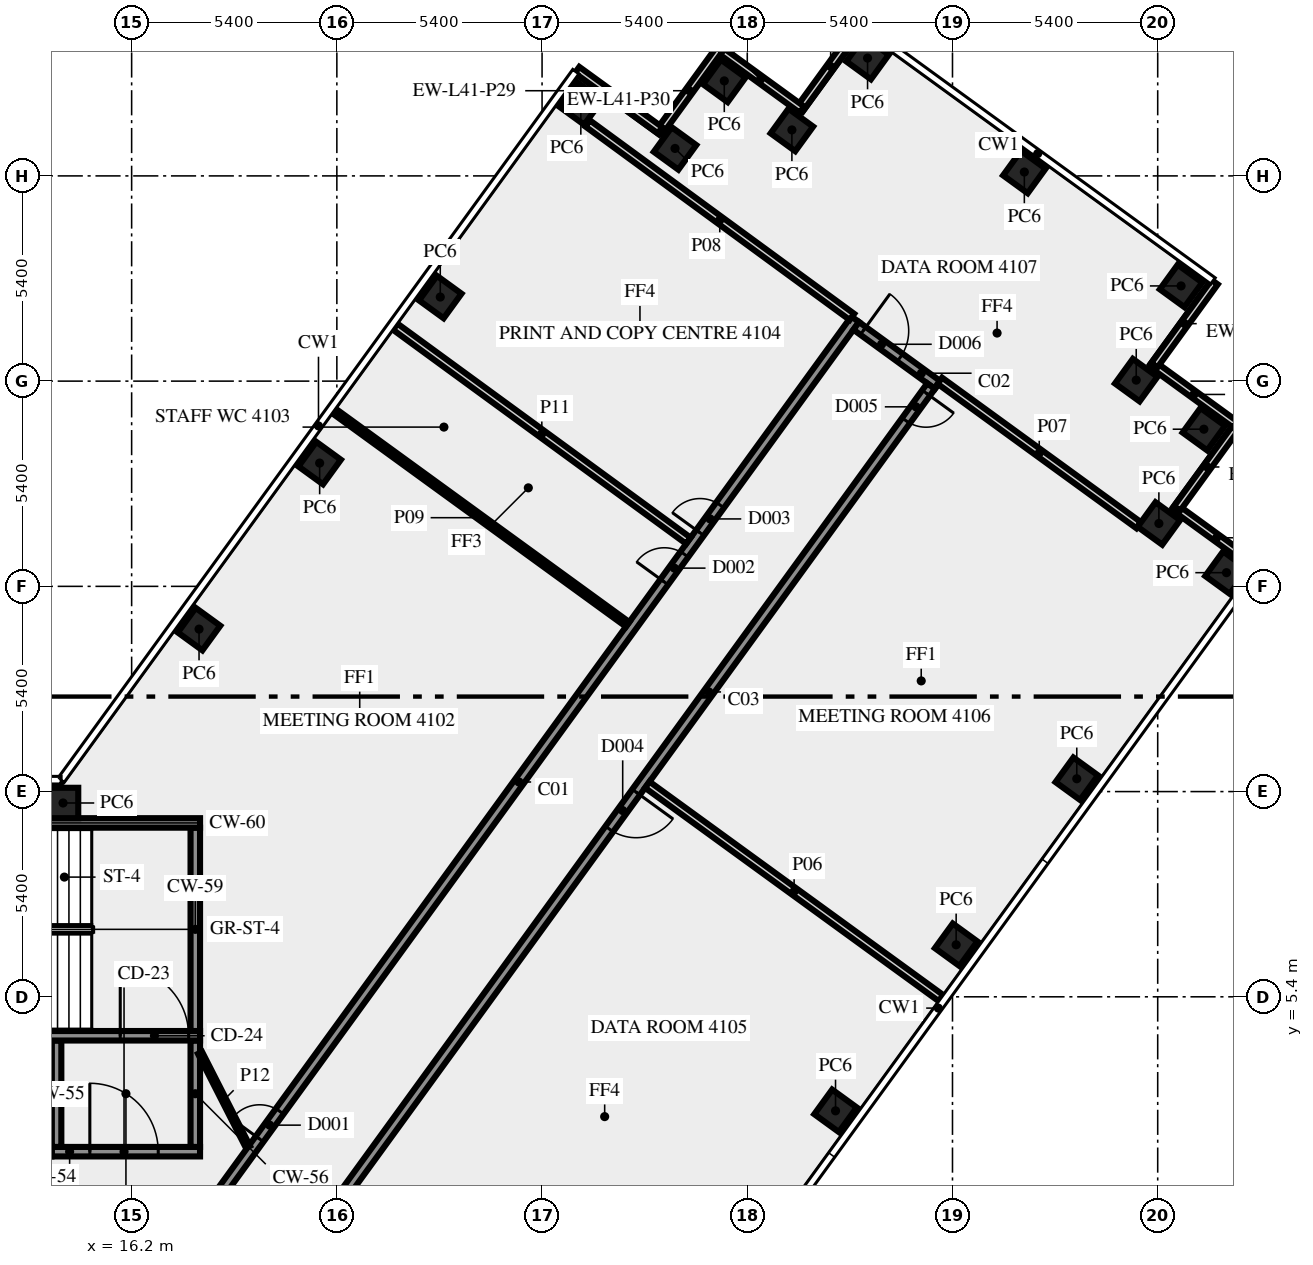
"""IFC4 building model, lengths in metres.
Left out: names, types, materials, properties, quantities, classifications, styles, units other than length and angle.
Written with IfcOpenShell. Run it as: python <this file> out.ifc"""

import sys

from ifc_helpers import new_model, si_unit, direction, frame, frame_2d, origin, origin_2d, place, context, subcontext, project, spatial, rectangle, extrude, element, fill, save


model = new_model("IFC4")
c1 = context("Model", 3, precision=1e-05, world=origin(), true_north=direction((0.0, 1.0)))
c2 = subcontext(c1, "Body", "Model", "MODEL_VIEW")
j1 = project(units=[si_unit("LENGTHUNIT", "METRE"), si_unit("PLANEANGLEUNIT", "RADIAN")], contexts=[c1])
p1 = place(None, origin())
s1 = spatial("IfcSite", under=j1, at=p1, CompositionType="ELEMENT")
p2 = place(p1, origin())
s2 = spatial("IfcBuilding", under=s1, at=p2, CompositionType="ELEMENT")
p3 = place(p2, frame((0.0, 0.0, 176.0)))
s3 = spatial("IfcBuildingStorey", under=s2, at=p3, CompositionType="ELEMENT", Elevation=176.0)
for number, where, z_axis, x_axis in (
    (1, (34.722, 2.4, 0.0), (0.0, 0.0, 1.0), (0.588, 0.809, 0.0)),
    (2, (37.896, 6.769, 0.0), (0.0, 0.0, 1.0), (0.588, 0.809, 0.0)),
    (3, (41.07, 11.137, 0.0), (0.0, 0.0, 1.0), (0.588, 0.809, 0.0)),
    (4, (45.01, 16.56, 0.0), (0.0, 0.0, 1.0), (0.588, 0.809, 0.0)),
    (5, (43.231, 17.854, 0.0), (0.0, 0.0, 1.0), (0.588, 0.809, 0.0)),
    (6, (44.415, 20.335, 0.0), (0.0, 0.0, 1.0), (0.588, 0.809, 0.0)),
    (7, (42.635, 21.626, 0.0), (0.0, 0.0, 1.0), (-0.809, 0.588, 0.0)),
    (8, (43.815, 24.105, 0.0), (0.0, 0.0, 1.0), (-0.809, 0.588, 0.0)),
    (9, (39.691, 27.102, 0.0), (0.0, 0.0, 1.0), (-0.809, 0.588, 0.0)),
    (10, (35.565, 30.1, 0.0), (0.0, 0.0, 1.0), (-0.588, -0.809, 0.0)),
    (11, (33.574, 28.209, 0.0), (0.0, 0.0, 1.0), (-0.809, 0.588, 0.0)),
    (12, (31.795, 29.5, 0.0), (0.0, 0.0, 1.0), (-0.588, -0.809, 0.0)),
    (13, (30.499, 27.723, 0.0), (0.0, 0.0, 1.0), (-0.809, 0.588, 0.0)),
    (14, (28.02, 28.905, 0.0), (0.0, 0.0, 1.0), (-0.809, 0.588, 0.0)),
    (15, (24.321, 23.812, 0.0), (0.0, 0.0, 1.0), (-0.588, -0.809, 0.0)),
    (16, (21.147, 19.444, 0.0), (0.0, 0.0, 1.0), (-0.588, -0.809, 0.0)),
    (17, (17.974, 15.075, 0.0), (0.0, 0.0, 1.0), (-0.588, -0.809, 0.0)),
    (18, (14.395, 10.5, 0.0), (0.0, 0.0, 1.0), (-1.0, 0.0, 0.0)),
):
    element("IfcColumn", number, at=place(p3, frame(where, z_axis=z_axis, x_axis=x_axis)), inside=s3, PredefinedType="COLUMN", context=c2, shape_type="SweptSolid", body=[
        extrude(rectangle(XDim=0.8, YDim=0.8, at=origin_2d()), origin(), (0.0, 0.0, 1.0), 3.65),
    ])
for number, where, z_axis, x_axis in (
    (19, (45.842, 16.685, 0.0), (0.0, 0.0, 1.0), (-0.809, 0.588, 0.0)),
    (20, (43.709, 18.249, 0.0), (0.0, 0.0, 1.0), (0.588, 0.809, 0.0)),
    (21, (45.245, 20.456, 0.0), (0.0, 0.0, 1.0), (-0.809, 0.588, 0.0)),
    (22, (43.113, 22.02, 0.0), (0.0, 0.0, 1.0), (0.588, 0.809, 0.0)),
    (23, (35.388, 30.97, 0.0), (0.0, 0.0, 1.0), (-0.588, -0.809, 0.0)),
    (24, (33.838, 28.744, 0.0), (0.0, 0.0, 1.0), (-0.809, 0.588, 0.0)),
    (25, (31.67, 30.333, 0.0), (0.0, 0.0, 1.0), (-0.588, -0.809, 0.0)),
    (26, (30.106, 28.2, 0.0), (0.0, 0.0, 1.0), (-0.809, 0.588, 0.0)),
):
    element("IfcWall", number, at=place(p3, frame(where, z_axis=z_axis, x_axis=x_axis)), inside=s3, PredefinedType="SOLIDWALL", context=c2, shape_type="SweptSolid", body=[
        extrude(rectangle(XDim=2.7, YDim=0.2, at=frame_2d((1.35, 0.0))), origin(), (0.0, 0.0, 1.0), 3.65),
    ])
p4 = place(p3, frame((14.1, 1.325, 0.0), z_axis=(0.0, 0.0, 1.0), x_axis=(1.0, 0.0, 0.0)))
e27 = element("IfcWall", 27, at=p4, inside=s3, PredefinedType="SHEAR", context=c2, shape_type="SweptSolid", body=[
    extrude(rectangle(XDim=3.9, YDim=0.25, at=frame_2d((1.95, 0.0))), origin(), (0.0, 0.0, 1.0), 3.65),
])
p5 = place(p4, frame((1.0, 0.0, 0.0)))
e28 = element("IfcOpeningElement", 28, at=p5, cuts=e27, PredefinedType="OPENING", context=c2, shape_type="SweptSolid", body=[
    extrude(rectangle(XDim=1.8, YDim=2.1, at=frame_2d((0.9, 1.05))), frame((0.0, 0.135, 0.0), z_axis=(0.0, -1.0, 0.0), x_axis=(1.0, 0.0, 0.0)), (0.0, 0.0, 1.0), 0.27),
])
for number, where, z_axis, x_axis in (
    (29, (14.225, 1.45, 0.0), (0.0, 0.0, 1.0), (0.0, 1.0, 0.0)),
    (30, (17.875, 1.45, 0.0), (0.0, 0.0, 1.0), (0.0, 1.0, 0.0)),
):
    element("IfcWall", number, at=place(p3, frame(where, z_axis=z_axis, x_axis=x_axis)), inside=s3, PredefinedType="SHEAR", context=c2, shape_type="SweptSolid", body=[
        extrude(rectangle(XDim=2.8, YDim=0.25, at=frame_2d((1.4, 0.0))), origin(), (0.0, 0.0, 1.0), 3.65),
    ])
p6 = place(p3, frame((7.5, 4.375, 0.0), z_axis=(0.0, 0.0, 1.0), x_axis=(1.0, 0.0, 0.0)))
e31 = element("IfcWall", 31, at=p6, inside=s3, PredefinedType="SHEAR", context=c2, shape_type="SweptSolid", body=[
    extrude(rectangle(XDim=10.5, YDim=0.25, at=frame_2d((5.25, 0.0))), origin(), (0.0, 0.0, 1.0), 3.65),
])
p7 = place(p6, frame((8.4, 0.0, 0.0)))
e32 = element("IfcOpeningElement", 32, at=p7, cuts=e31, PredefinedType="OPENING", context=c2, shape_type="SweptSolid", body=[
    extrude(rectangle(XDim=1.8, YDim=2.1, at=frame_2d((0.9, 1.05))), frame((0.0, 0.135, 0.0), z_axis=(0.0, -1.0, 0.0), x_axis=(1.0, 0.0, 0.0)), (0.0, 0.0, 1.0), 0.27),
])
p8 = place(p3, frame((17.875, 4.5, 0.0), z_axis=(0.0, 0.0, 1.0), x_axis=(0.0, 1.0, 0.0)))
e33 = element("IfcWall", 33, at=p8, inside=s3, PredefinedType="SHEAR", context=c2, shape_type="SweptSolid", body=[
    extrude(rectangle(XDim=5.35, YDim=0.25, at=frame_2d((2.675, 0.0))), origin(), (0.0, 0.0, 1.0), 3.65),
])
p9 = place(p3, frame((7.5, 9.975, 0.0), z_axis=(0.0, 0.0, 1.0), x_axis=(1.0, 0.0, 0.0)))
e34 = element("IfcWall", 34, at=p9, inside=s3, PredefinedType="SHEAR", context=c2, shape_type="SweptSolid", body=[
    extrude(rectangle(XDim=10.5, YDim=0.25, at=frame_2d((5.25, 0.0))), origin(), (0.0, 0.0, 1.0), 3.65),
])
p10 = place(p9, frame((2.0, 0.0, 1.0)))
e35 = element("IfcOpeningElement", 35, at=p10, cuts=e34, PredefinedType="OPENING", context=c2, shape_type="SweptSolid", body=[
    extrude(rectangle(XDim=1.2, YDim=1.2, at=frame_2d((0.6, 0.6))), frame((0.0, 0.135, 0.0), z_axis=(0.0, -1.0, 0.0), x_axis=(1.0, 0.0, 0.0)), (0.0, 0.0, 1.0), 0.27),
])
p11 = place(p3, frame((17.545, -1.125, 0.0), z_axis=(0.0, 0.0, 1.0), x_axis=(0.587786330937, 0.809016210693, 0.0)))
e36 = element("IfcWall", 36, at=p11, inside=s3, PredefinedType="SOLIDWALL", context=c2, shape_type="SweptSolid", body=[
    extrude(rectangle(XDim=30.103, YDim=0.25, at=frame_2d((15.052, 0.0))), origin(), (0.0, 0.0, 1.0), 3.65),
])
p12 = place(p11, frame((3.441, 0.0, 0.0)))
e37 = element("IfcOpeningElement", 37, at=p12, cuts=e36, PredefinedType="OPENING", context=c2, shape_type="SweptSolid", body=[
    extrude(rectangle(XDim=0.9, YDim=2.1, at=frame_2d((0.45, 1.05))), frame((0.0, 0.135, 0.0), z_axis=(0.0, -1.0, 0.0), x_axis=(1.0, 0.0, 0.0)), (0.0, 0.0, 1.0), 0.27),
])
p13 = place(p11, frame((23.158, 0.0, 0.0)))
e38 = element("IfcOpeningElement", 38, at=p13, cuts=e36, PredefinedType="OPENING", context=c2, shape_type="SweptSolid", body=[
    extrude(rectangle(XDim=0.9, YDim=2.1, at=frame_2d((0.45, 1.05))), frame((0.0, 0.135, 0.0), z_axis=(0.0, -1.0, 0.0), x_axis=(1.0, 0.0, 0.0)), (0.0, 0.0, 1.0), 0.27),
])
p14 = place(p11, frame((21.558, 0.0, 0.0)))
e39 = element("IfcOpeningElement", 39, at=p14, cuts=e36, PredefinedType="OPENING", context=c2, shape_type="SweptSolid", body=[
    extrude(rectangle(XDim=0.9, YDim=2.1, at=frame_2d((0.45, 1.05))), frame((0.0, 0.135, 0.0), z_axis=(0.0, -1.0, 0.0), x_axis=(1.0, 0.0, 0.0)), (0.0, 0.0, 1.0), 0.27),
])
p15 = place(p3, frame((35.267, 23.054, 0.0), z_axis=(0.0, 0.0, 1.0), x_axis=(0.809038743598, -0.587755315891, 0.0)))
e40 = element("IfcWall", 40, at=p15, inside=s3, PredefinedType="SOLIDWALL", context=c2, shape_type="SweptSolid", body=[
    extrude(rectangle(XDim=2.65, YDim=0.25, at=frame_2d((1.325, 0.0))), origin(), (0.0, 0.0, 1.0), 3.65),
])
p16 = place(p15, frame((0.224, 0.0, 0.0)))
e41 = element("IfcOpeningElement", 41, at=p16, cuts=e40, PredefinedType="OPENING", context=c2, shape_type="SweptSolid", body=[
    extrude(rectangle(XDim=1.2, YDim=2.1, at=frame_2d((0.6, 1.05))), frame((0.0, 0.135, 0.0), z_axis=(0.0, -1.0, 0.0), x_axis=(1.0, 0.0, 0.0)), (0.0, 0.0, 1.0), 0.27),
])
p17 = place(p3, frame((37.236, 21.469, 0.0), z_axis=(0.0, 0.0, 1.0), x_axis=(-0.58778344073, -0.809018310549, 0.0)))
e42 = element("IfcWall", 42, at=p17, inside=s3, PredefinedType="SOLIDWALL", context=c2, shape_type="SweptSolid", body=[
    extrude(rectangle(XDim=28.42, YDim=0.25, at=frame_2d((14.21, 0.0))), origin(), (0.0, 0.0, 1.0), 3.65),
])
p18 = place(p17, frame((13.205, 0.0, 0.0)))
e43 = element("IfcOpeningElement", 43, at=p18, cuts=e42, PredefinedType="OPENING", context=c2, shape_type="SweptSolid", body=[
    extrude(rectangle(XDim=1.2, YDim=2.1, at=frame_2d((0.6, 1.05))), frame((0.0, 0.135, 0.0), z_axis=(0.0, -1.0, 0.0), x_axis=(1.0, 0.0, 0.0)), (0.0, 0.0, 1.0), 0.27),
])
p19 = place(p17, frame((0.224, 0.0, 0.0)))
e44 = element("IfcOpeningElement", 44, at=p19, cuts=e42, PredefinedType="OPENING", context=c2, shape_type="SweptSolid", body=[
    extrude(rectangle(XDim=0.9, YDim=2.1, at=frame_2d((0.45, 1.05))), frame((0.0, 0.135, 0.0), z_axis=(0.0, -1.0, 0.0), x_axis=(1.0, 0.0, 0.0)), (0.0, 0.0, 1.0), 0.27),
])
p20 = place(p3, frame((37.496, 5.367, 0.0), z_axis=(0.0, 0.0, 1.0), x_axis=(-0.809048817734, 0.587741448702, 0.0)))
e45 = element("IfcWall", 45, at=p20, inside=s3, PredefinedType="SOLIDWALL", context=c2, shape_type="SweptSolid", body=[
    extrude(rectangle(XDim=9.55, YDim=0.2, at=frame_2d((4.775, 0.0))), origin(), (0.0, 0.0, 1.0), 2.85),
])
p21 = place(p3, frame((37.468, 21.61, 0.0), z_axis=(0.0, 0.0, 1.0), x_axis=(0.80901688725, -0.587785399737, 0.0)))
e46 = element("IfcWall", 46, at=p21, inside=s3, PredefinedType="SOLIDWALL", context=c2, shape_type="SweptSolid", body=[
    extrude(rectangle(XDim=6.465, YDim=0.2, at=frame_2d((3.232, 0.0))), origin(), (0.0, 0.0, 1.0), 3.65),
])
p22 = place(p3, frame((28.198, 28.381, 0.0), z_axis=(0.0, 0.0, 1.0), x_axis=(0.806977317905, -0.590582431492, 0.0)))
e47 = element("IfcWall", 47, at=p22, inside=s3, PredefinedType="SOLIDWALL", context=c2, shape_type="SweptSolid", body=[
    extrude(rectangle(XDim=8.62, YDim=0.2, at=frame_2d((4.31, 0.0))), origin(), (0.0, 0.0, 1.0), 3.65),
])
p23 = place(p3, frame((29.251, 15.2, 0.0), z_axis=(0.0, 0.0, 1.0), x_axis=(-0.808994684961, 0.587815957341, 0.0)))
e48 = element("IfcWall", 48, at=p23, inside=s3, PredefinedType="PARTITIONING", context=c2, shape_type="SweptSolid", body=[
    extrude(rectangle(XDim=9.55, YDim=0.15, at=frame_2d((4.775, 0.0))), origin(), (0.0, 0.0, 1.0), 2.85),
])
p24 = place(p3, frame((23.137, 23.032, 0.0), z_axis=(0.0, 0.0, 1.0), x_axis=(0.807661302092, -0.589646691759, 0.0)))
e49 = element("IfcWall", 49, at=p24, inside=s3, PredefinedType="SOLIDWALL", context=c2, shape_type="SweptSolid", body=[
    extrude(rectangle(XDim=9.55, YDim=0.2, at=frame_2d((4.775, 0.0))), origin(), (0.0, 0.0, 1.0), 2.85),
])
p25 = place(p3, frame((18.0, 3.925, 0.0), z_axis=(0.0, 0.0, 1.0), x_axis=(0.453950796792, -0.891026752736, 0.0)))
e50 = element("IfcWall", 50, at=p25, inside=s3, PredefinedType="PARTITIONING", context=c2, shape_type="SweptSolid", body=[
    extrude(rectangle(XDim=2.778, YDim=0.12, at=frame_2d((1.389, 0.0))), origin(), (0.0, 0.0, 1.0), 3.65),
])
p26 = place(p5, origin())
e51 = element("IfcDoor", 51, at=p26, inside=s3, OperationType="DOUBLE_DOOR_SINGLE_SWING", PredefinedType="DOOR", context=c2, shape_type="SweptSolid", body=[
    extrude(rectangle(XDim=1.8, YDim=2.1, at=frame_2d((0.9, 1.05))), frame((0.0, 0.025, 0.0), z_axis=(0.0, -1.0, 0.0), x_axis=(1.0, 0.0, 0.0)), (0.0, 0.0, 1.0), 0.05),
])
fill(e28, e51)
p27 = place(p7, origin())
e52 = element("IfcDoor", 52, at=p27, inside=s3, OperationType="DOUBLE_DOOR_SINGLE_SWING", PredefinedType="DOOR", context=c2, shape_type="SweptSolid", body=[
    extrude(rectangle(XDim=1.8, YDim=2.1, at=frame_2d((0.9, 1.05))), frame((0.0, 0.025, 0.0), z_axis=(0.0, -1.0, 0.0), x_axis=(1.0, 0.0, 0.0)), (0.0, 0.0, 1.0), 0.05),
])
fill(e32, e52)
p28 = place(p18, origin())
e53 = element("IfcDoor", 53, at=p28, inside=s3, OperationType="SINGLE_SWING_LEFT", PredefinedType="DOOR", context=c2, shape_type="SweptSolid", body=[
    extrude(rectangle(XDim=1.2, YDim=2.1, at=frame_2d((0.6, 1.05))), frame((0.0, 0.025, 0.0), z_axis=(0.0, -1.0, 0.0), x_axis=(1.0, 0.0, 0.0)), (0.0, 0.0, 1.0), 0.05),
])
fill(e43, e53)
p29 = place(p16, origin())
e54 = element("IfcDoor", 54, at=p29, inside=s3, OperationType="SINGLE_SWING_LEFT", PredefinedType="DOOR", context=c2, shape_type="SweptSolid", body=[
    extrude(rectangle(XDim=1.2, YDim=2.1, at=frame_2d((0.6, 1.05))), frame((0.0, 0.025, 0.0), z_axis=(0.0, -1.0, 0.0), x_axis=(1.0, 0.0, 0.0)), (0.0, 0.0, 1.0), 0.05),
])
fill(e41, e54)
p30 = place(p12, origin())
e55 = element("IfcDoor", 55, at=p30, inside=s3, OperationType="SINGLE_SWING_LEFT", PredefinedType="DOOR", context=c2, shape_type="SweptSolid", body=[
    extrude(rectangle(XDim=0.9, YDim=2.1, at=frame_2d((0.45, 1.05))), frame((0.0, 0.025, 0.0), z_axis=(0.0, -1.0, 0.0), x_axis=(1.0, 0.0, 0.0)), (0.0, 0.0, 1.0), 0.05),
])
fill(e37, e55)
p31 = place(p19, origin())
e56 = element("IfcDoor", 56, at=p31, inside=s3, OperationType="SINGLE_SWING_LEFT", PredefinedType="DOOR", context=c2, shape_type="SweptSolid", body=[
    extrude(rectangle(XDim=0.9, YDim=2.1, at=frame_2d((0.45, 1.05))), frame((0.0, 0.025, 0.0), z_axis=(0.0, -1.0, 0.0), x_axis=(1.0, 0.0, 0.0)), (0.0, 0.0, 1.0), 0.05),
])
fill(e44, e56)
p32 = place(p13, origin())
e57 = element("IfcDoor", 57, at=p32, inside=s3, OperationType="SINGLE_SWING_LEFT", PredefinedType="DOOR", context=c2, shape_type="SweptSolid", body=[
    extrude(rectangle(XDim=0.9, YDim=2.1, at=frame_2d((0.45, 1.05))), frame((0.0, 0.025, 0.0), z_axis=(0.0, -1.0, 0.0), x_axis=(1.0, 0.0, 0.0)), (0.0, 0.0, 1.0), 0.05),
])
fill(e38, e57)
p33 = place(p14, origin())
e58 = element("IfcDoor", 58, at=p33, inside=s3, OperationType="SINGLE_SWING_RIGHT", PredefinedType="DOOR", context=c2, shape_type="SweptSolid", body=[
    extrude(rectangle(XDim=0.9, YDim=2.1, at=frame_2d((0.45, 1.05))), frame((0.0, 0.025, 0.0), z_axis=(0.0, -1.0, 0.0), x_axis=(1.0, 0.0, 0.0)), (0.0, 0.0, 1.0), 0.05),
])
fill(e39, e58)
save(model, sys.argv[1])
